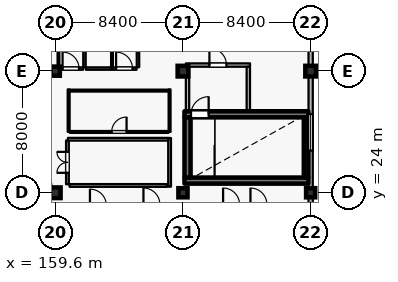
"""IFC4 building model, lengths in metres.
Left out: names, types, materials, properties, quantities, classifications, styles, units other than length and angle.
Written with IfcOpenShell. Run it as: python <this file> out.ifc"""

import sys

from ifc_helpers import new_model, si_unit, direction, frame, frame_2d, origin, origin_2d, place, context, subcontext, project, spatial, rectangle, extrude, element, fill, save


model = new_model("IFC4")
c1 = context("Model", 3, precision=1e-05, world=origin(), true_north=direction((0.0, 1.0)))
c2 = subcontext(c1, "Body", "Model", "MODEL_VIEW")
j1 = project(units=[si_unit("LENGTHUNIT", "METRE"), si_unit("PLANEANGLEUNIT", "RADIAN")], contexts=[c1])
p1 = place(None, origin())
s1 = spatial("IfcSite", under=j1, at=p1, CompositionType="ELEMENT")
p2 = place(p1, origin())
s2 = spatial("IfcBuilding", under=s1, at=p2, CompositionType="ELEMENT")
p3 = place(p2, frame((0.0, 0.0, 32.4)))
s3 = spatial("IfcBuildingStorey", under=s2, at=p3, CompositionType="ELEMENT", Elevation=32.4)
for number, where, z_axis, x_axis in (
    (1, (159.6, 24.0, 0.0), (0.0, 0.0, 1.0), (1.0, 0.0, 0.0)),
    (2, (168.0, 32.0, 0.0), (0.0, 0.0, 1.0), (1.0, 0.0, 0.0)),
    (3, (176.4, 32.0, 0.0), (0.0, 0.0, 1.0), (1.0, 0.0, 0.0)),
):
    element("IfcColumn", number, at=place(p3, frame(where, z_axis=z_axis, x_axis=x_axis)), inside=s3, PredefinedType="COLUMN", context=c2, shape_type="SweptSolid", body=[
        extrude(rectangle(XDim=0.7, YDim=0.7, at=origin_2d()), origin(), (0.0, 0.0, 1.0), 3.6),
    ])
for number, where, z_axis, x_axis in (
    (4, (159.6, 32.0, 0.0), (0.0, 0.0, 1.0), (1.0, 0.0, 0.0)),
    (5, (168.0, 24.0, 0.0), (0.0, 0.0, 1.0), (1.0, 0.0, 0.0)),
    (6, (176.4, 24.0, 0.0), (0.0, 0.0, 1.0), (1.0, 0.0, 0.0)),
):
    element("IfcColumn", number, at=place(p3, frame(where, z_axis=z_axis, x_axis=x_axis)), inside=s3, PredefinedType="COLUMN", context=c2, shape_type="SweptSolid", body=[
        extrude(rectangle(XDim=0.6, YDim=0.6, at=origin_2d()), origin(), (0.0, 0.0, 1.0), 3.6),
    ])
p4 = place(p3, frame((176.4, 39.7, 0.0), z_axis=(0.0, 0.0, 1.0), x_axis=(0.0, -1.0, 0.0)))
e7 = element("IfcWall", 7, at=p4, inside=s3, PredefinedType="SOLIDWALL", context=c2, shape_type="SweptSolid", body=[
    extrude(rectangle(XDim=7.35, YDim=0.28, at=frame_2d((3.675, 0.0))), origin(), (0.0, 0.0, 1.0), 2.7),
])
p5 = place(p4, frame((3.15, 0.0, 0.5)))
e8 = element("IfcOpeningElement", 8, at=p5, cuts=e7, PredefinedType="OPENING", context=c2, shape_type="SweptSolid", body=[
    extrude(rectangle(XDim=1.05, YDim=1.65, at=frame_2d((0.525, 0.825))), frame((0.0, 0.15, 0.0), z_axis=(0.0, -1.0, 0.0), x_axis=(1.0, 0.0, 0.0)), (0.0, 0.0, 1.0), 0.3),
])
p6 = place(p3, frame((176.4, 31.65, 0.0), z_axis=(0.0, 0.0, 1.0), x_axis=(0.0, -1.0, 0.0)))
e9 = element("IfcWall", 9, at=p6, inside=s3, PredefinedType="SOLIDWALL", context=c2, shape_type="SweptSolid", body=[
    extrude(rectangle(XDim=7.35, YDim=0.28, at=frame_2d((3.675, 0.0))), origin(), (0.0, 0.0, 1.0), 2.7),
])
p7 = place(p6, frame((2.475, 0.0, 0.5)))
e10 = element("IfcOpeningElement", 10, at=p7, cuts=e9, PredefinedType="OPENING", context=c2, shape_type="SweptSolid", body=[
    extrude(rectangle(XDim=2.4, YDim=1.65, at=frame_2d((1.2, 0.825))), frame((0.0, 0.15, 0.0), z_axis=(0.0, -1.0, 0.0), x_axis=(1.0, 0.0, 0.0)), (0.0, 0.0, 1.0), 0.3),
])
p8 = place(p3, frame((176.4, 23.7, 0.0), z_axis=(0.0, 0.0, 1.0), x_axis=(0.0, -1.0, 0.0)))
e11 = element("IfcWall", 11, at=p8, inside=s3, PredefinedType="SOLIDWALL", context=c2, shape_type="SweptSolid", body=[
    extrude(rectangle(XDim=7.35, YDim=0.28, at=frame_2d((3.675, 0.0))), origin(), (0.0, 0.0, 1.0), 2.7),
])
p9 = place(p8, frame((2.475, 0.0, 0.5)))
e12 = element("IfcOpeningElement", 12, at=p9, cuts=e11, PredefinedType="OPENING", context=c2, shape_type="SweptSolid", body=[
    extrude(rectangle(XDim=2.4, YDim=1.65, at=frame_2d((1.2, 0.825))), frame((0.0, 0.15, 0.0), z_axis=(0.0, -1.0, 0.0), x_axis=(1.0, 0.0, 0.0)), (0.0, 0.0, 1.0), 0.3),
])
p10 = place(p3, frame((168.1, 24.8, 0.0), z_axis=(0.0, 0.0, 1.0), x_axis=(1.0, 0.0, 0.0)))
e13 = element("IfcWall", 13, at=p10, inside=s3, PredefinedType="SHEAR", context=c2, shape_type="SweptSolid", body=[
    extrude(rectangle(XDim=8.15, YDim=0.4, at=frame_2d((4.075, 0.0))), origin(), (0.0, 0.0, 1.0), 3.335),
])
p11 = place(p3, frame((176.1, 25.005, 0.0), z_axis=(0.0, 0.0, 1.0), x_axis=(0.0, 1.0, 0.0)))
e14 = element("IfcWall", 14, at=p11, inside=s3, PredefinedType="SHEAR", context=c2, shape_type="SweptSolid", body=[
    extrude(rectangle(XDim=3.95, YDim=0.3, at=frame_2d((1.975, 0.0))), origin(), (0.0, 0.0, 1.0), 3.335),
])
p12 = place(p3, frame((168.1, 29.16, 0.0), z_axis=(0.0, 0.0, 1.0), x_axis=(1.0, 0.0, 0.0)))
e15 = element("IfcWall", 15, at=p12, inside=s3, PredefinedType="SHEAR", context=c2, shape_type="SweptSolid", body=[
    extrude(rectangle(XDim=8.15, YDim=0.4, at=frame_2d((4.075, 0.0))), origin(), (0.0, 0.0, 1.0), 3.335),
])
p13 = place(p12, frame((0.43, 0.0, 0.0)))
e16 = element("IfcOpeningElement", 16, at=p13, cuts=e15, PredefinedType="OPENING", context=c2, shape_type="SweptSolid", body=[
    extrude(rectangle(XDim=1.16, YDim=2.2, at=frame_2d((0.58, 1.1))), frame((0.0, 0.21, 0.0), z_axis=(0.0, -1.0, 0.0), x_axis=(1.0, 0.0, 0.0)), (0.0, 0.0, 1.0), 0.42),
])
p14 = place(p3, frame((168.3, 25.005, 0.0), z_axis=(0.0, 0.0, 1.0), x_axis=(0.0, 1.0, 0.0)))
e17 = element("IfcWall", 17, at=p14, inside=s3, PredefinedType="SHEAR", context=c2, shape_type="SweptSolid", body=[
    extrude(rectangle(XDim=3.95, YDim=0.4, at=frame_2d((1.975, 0.0))), origin(), (0.0, 0.0, 1.0), 3.335),
])
p15 = place(p3, frame((168.3, 29.365, 0.0), z_axis=(0.0, 0.0, 1.0), x_axis=(0.0, 1.0, 0.0)))
e18 = element("IfcWall", 18, at=p15, inside=s3, PredefinedType="PARTITIONING", context=c2, shape_type="SweptSolid", body=[
    extrude(rectangle(XDim=2.92, YDim=0.22, at=frame_2d((1.46, 0.0))), origin(), (0.0, 0.0, 1.0), 3.335),
])
p16 = place(p3, frame((168.19, 32.4, 0.0), z_axis=(0.0, 0.0, 1.0), x_axis=(1.0, 0.0, 0.0)))
e19 = element("IfcWall", 19, at=p16, inside=s3, PredefinedType="PARTITIONING", context=c2, shape_type="SweptSolid", body=[
    extrude(rectangle(XDim=4.22, YDim=0.22, at=frame_2d((2.11, 0.0))), origin(), (0.0, 0.0, 1.0), 3.335),
])
p17 = place(p16, frame((1.55, 0.0, 0.0)))
e20 = element("IfcOpeningElement", 20, at=p17, cuts=e19, PredefinedType="OPENING", context=c2, shape_type="SweptSolid", body=[
    extrude(rectangle(XDim=1.12, YDim=2.2, at=frame_2d((0.56, 1.1))), frame((0.0, 0.12, 0.0), z_axis=(0.0, -1.0, 0.0), x_axis=(1.0, 0.0, 0.0)), (0.0, 0.0, 1.0), 0.24),
])
p18 = place(p3, frame((172.3, 29.365, 0.0), z_axis=(0.0, 0.0, 1.0), x_axis=(0.0, 1.0, 0.0)))
e21 = element("IfcWall", 21, at=p18, inside=s3, PredefinedType="PARTITIONING", context=c2, shape_type="SweptSolid", body=[
    extrude(rectangle(XDim=2.92, YDim=0.22, at=frame_2d((1.46, 0.0))), origin(), (0.0, 0.0, 1.0), 3.335),
])
p19 = place(p3, frame((158.09, 32.17, 0.0), z_axis=(0.0, 0.0, 1.0), x_axis=(1.0, 0.0, 0.0)))
e22 = element("IfcWall", 22, at=p19, inside=s3, PredefinedType="PARTITIONING", context=c2, shape_type="SweptSolid", body=[
    extrude(rectangle(XDim=1.71, YDim=0.16, at=frame_2d((0.855, 0.0))), origin(), (0.0, 0.0, 1.0), 2.84),
])
p20 = place(p3, frame((159.81, 32.17, 0.0), z_axis=(0.0, 0.0, 1.0), x_axis=(1.0, 0.0, 0.0)))
e23 = element("IfcWall", 23, at=p20, inside=s3, PredefinedType="PARTITIONING", context=c2, shape_type="SweptSolid", body=[
    extrude(rectangle(XDim=1.62, YDim=0.16, at=frame_2d((0.81, 0.0))), origin(), (0.0, 0.0, 1.0), 3.335),
])
p21 = place(p20, frame((0.27, 0.0, 0.0)))
e24 = element("IfcOpeningElement", 24, at=p21, cuts=e23, PredefinedType="OPENING", context=c2, shape_type="SweptSolid", body=[
    extrude(rectangle(XDim=1.08, YDim=2.3, at=frame_2d((0.54, 1.15))), frame((0.0, 0.09, 0.0), z_axis=(0.0, -1.0, 0.0), x_axis=(1.0, 0.0, 0.0)), (0.0, 0.0, 1.0), 0.18),
])
p22 = place(p3, frame((159.81, 32.26, 0.0), z_axis=(0.0, 0.0, 1.0), x_axis=(0.0, 1.0, 0.0)))
e25 = element("IfcWall", 25, at=p22, inside=s3, PredefinedType="PARTITIONING", context=c2, shape_type="SweptSolid", body=[
    extrude(rectangle(XDim=2.45, YDim=0.115, at=frame_2d((1.225, 0.0))), origin(), (0.0, 0.0, 1.0), 2.74),
])
p23 = place(p3, frame((161.61, 32.17, 0.0), z_axis=(0.0, 0.0, 1.0), x_axis=(1.0, 0.0, 0.0)))
e26 = element("IfcWall", 26, at=p23, inside=s3, PredefinedType="PARTITIONING", context=c2, shape_type="SweptSolid", body=[
    extrude(rectangle(XDim=1.71, YDim=0.16, at=frame_2d((0.855, 0.0))), origin(), (0.0, 0.0, 1.0), 3.335),
])
p24 = place(p3, frame((163.33, 32.17, 0.0), z_axis=(0.0, 0.0, 1.0), x_axis=(1.0, 0.0, 0.0)))
e27 = element("IfcWall", 27, at=p24, inside=s3, PredefinedType="PARTITIONING", context=c2, shape_type="SweptSolid", body=[
    extrude(rectangle(XDim=1.62, YDim=0.16, at=frame_2d((0.81, 0.0))), origin(), (0.0, 0.0, 1.0), 3.335),
])
p25 = place(p24, frame((0.27, 0.0, 0.0)))
e28 = element("IfcOpeningElement", 28, at=p25, cuts=e27, PredefinedType="OPENING", context=c2, shape_type="SweptSolid", body=[
    extrude(rectangle(XDim=1.08, YDim=2.3, at=frame_2d((0.54, 1.15))), frame((0.0, 0.09, 0.0), z_axis=(0.0, -1.0, 0.0), x_axis=(1.0, 0.0, 0.0)), (0.0, 0.0, 1.0), 0.18),
])
p26 = place(p3, frame((163.33, 32.26, 0.0), z_axis=(0.0, 0.0, 1.0), x_axis=(0.0, 1.0, 0.0)))
e29 = element("IfcWall", 29, at=p26, inside=s3, PredefinedType="PARTITIONING", context=c2, shape_type="SweptSolid", body=[
    extrude(rectangle(XDim=2.45, YDim=0.115, at=frame_2d((1.225, 0.0))), origin(), (0.0, 0.0, 1.0), 3.335),
])
p27 = place(p3, frame((161.52, 32.26, 0.0), z_axis=(0.0, 0.0, 1.0), x_axis=(0.0, 1.0, 0.0)))
e30 = element("IfcWall", 30, at=p27, inside=s3, PredefinedType="PARTITIONING", context=c2, shape_type="SweptSolid", body=[
    extrude(rectangle(XDim=9.23, YDim=0.16, at=frame_2d((4.615, 0.0))), origin(), (0.0, 0.0, 1.0), 3.335),
])
p28 = place(p3, frame((165.04, 32.26, 0.0), z_axis=(0.0, 0.0, 1.0), x_axis=(0.0, 1.0, 0.0)))
e31 = element("IfcWall", 31, at=p28, inside=s3, PredefinedType="PARTITIONING", context=c2, shape_type="SweptSolid", body=[
    extrude(rectangle(XDim=8.64, YDim=0.16, at=frame_2d((4.32, 0.0))), origin(), (0.0, 0.0, 1.0), 3.335),
])
p29 = place(p3, frame((160.4, 24.56, 0.0), z_axis=(0.0, 0.0, 1.0), x_axis=(0.0, 1.0, 0.0)))
e32 = element("IfcWall", 32, at=p29, inside=s3, PredefinedType="PARTITIONING", context=c2, shape_type="SweptSolid", body=[
    extrude(rectangle(XDim=2.88, YDim=0.18, at=frame_2d((1.44, 0.0))), origin(), (0.0, 0.0, 1.0), 3.335),
])
p30 = place(p29, frame((0.75, 0.0, 0.0)))
e33 = element("IfcOpeningElement", 33, at=p30, cuts=e32, PredefinedType="OPENING", context=c2, shape_type="SweptSolid", body=[
    extrude(rectangle(XDim=1.38, YDim=2.3, at=frame_2d((0.69, 1.15))), frame((0.0, 0.1, 0.0), z_axis=(0.0, -1.0, 0.0), x_axis=(1.0, 0.0, 0.0)), (0.0, 0.0, 1.0), 0.2),
])
p31 = place(p3, frame((160.54, 24.48, 0.0), z_axis=(0.0, 0.0, 1.0), x_axis=(1.0, 0.0, 0.0)))
e34 = element("IfcWall", 34, at=p31, inside=s3, PredefinedType="PARTITIONING", context=c2, shape_type="SweptSolid", body=[
    extrude(rectangle(XDim=6.41, YDim=0.18, at=frame_2d((3.205, 0.0))), origin(), (0.0, 0.0, 1.0), 3.335),
])
p32 = place(p3, frame((160.56, 28.0, 0.0), z_axis=(0.0, 0.0, 1.0), x_axis=(1.0, 0.0, 0.0)))
e35 = element("IfcWall", 35, at=p32, inside=s3, PredefinedType="PARTITIONING", context=c2, shape_type="SweptSolid", body=[
    extrude(rectangle(XDim=6.48, YDim=0.125, at=frame_2d((3.24, 0.0))), origin(), (0.0, 0.0, 1.0), 3.335),
])
p33 = place(p32, frame((2.75, 0.0, 0.0)))
e36 = element("IfcOpeningElement", 36, at=p33, cuts=e35, PredefinedType="OPENING", context=c2, shape_type="SweptSolid", body=[
    extrude(rectangle(XDim=0.98, YDim=2.15, at=frame_2d((0.49, 1.075))), frame((0.0, 0.073, 0.0), z_axis=(0.0, -1.0, 0.0), x_axis=(1.0, 0.0, 0.0)), (0.0, 0.0, 1.0), 0.145),
])
p34 = place(p3, frame((167.12, 24.4, 0.0), z_axis=(0.0, 0.0, 1.0), x_axis=(0.0, 1.0, 0.0)))
e37 = element("IfcWall", 37, at=p34, inside=s3, PredefinedType="PARTITIONING", context=c2, shape_type="SweptSolid", body=[
    extrude(rectangle(XDim=3.2, YDim=0.18, at=frame_2d((1.6, 0.0))), origin(), (0.0, 0.0, 1.0), 3.335),
])
p35 = place(p3, frame((160.432, 27.52, 0.0), z_axis=(0.0, 0.0, 1.0), x_axis=(1.0, 0.0, 0.0)))
e38 = element("IfcWall", 38, at=p35, inside=s3, PredefinedType="PARTITIONING", context=c2, shape_type="SweptSolid", body=[
    extrude(rectangle(XDim=6.598, YDim=0.18, at=frame_2d((3.299, 0.0))), origin(), (0.0, 0.0, 1.0), 3.335),
])
for number, where, z_axis, x_axis in (
    (39, (160.48, 28.004, 0.0), (0.0, 0.0, 1.0), (0.0, 1.0, 0.0)),
    (40, (167.12, 28.004, 0.0), (0.0, 0.0, 1.0), (0.0, 1.0, 0.0)),
):
    element("IfcWall", number, at=place(p3, frame(where, z_axis=z_axis, x_axis=x_axis)), inside=s3, PredefinedType="PARTITIONING", context=c2, shape_type="SweptSolid", body=[
        extrude(rectangle(XDim=2.796, YDim=0.125, at=frame_2d((1.398, 0.0))), origin(), (0.0, 0.0, 1.0), 3.335),
    ])
p36 = place(p3, frame((160.543, 30.72, 0.0), z_axis=(0.0, 0.0, 1.0), x_axis=(1.0, 0.0, 0.0)))
e41 = element("IfcWall", 41, at=p36, inside=s3, PredefinedType="PARTITIONING", context=c2, shape_type="SweptSolid", body=[
    extrude(rectangle(XDim=6.514, YDim=0.125, at=frame_2d((3.257, 0.0))), origin(), (0.0, 0.0, 1.0), 3.335),
])
p37 = place(p7, origin())
e42 = element("IfcWindow", 42, at=p37, inside=s3, PartitioningType="DOUBLE_PANEL_VERTICAL", PredefinedType="WINDOW", context=c2, shape_type="SweptSolid", body=[
    extrude(rectangle(XDim=2.4, YDim=1.65, at=frame_2d((1.2, 0.825))), frame((0.0, 0.03, 0.0), z_axis=(0.0, -1.0, 0.0), x_axis=(1.0, 0.0, 0.0)), (0.0, 0.0, 1.0), 0.06),
])
fill(e10, e42)
p38 = place(p13, origin())
e43 = element("IfcDoor", 43, at=p38, inside=s3, OperationType="SINGLE_SWING_RIGHT", PredefinedType="DOOR", context=c2, shape_type="SweptSolid", body=[
    extrude(rectangle(XDim=1.16, YDim=2.2, at=frame_2d((0.58, 1.1))), frame((0.0, 0.025, 0.0), z_axis=(0.0, -1.0, 0.0), x_axis=(1.0, 0.0, 0.0)), (0.0, 0.0, 1.0), 0.05),
])
fill(e16, e43)
p39 = place(p17, origin())
e44 = element("IfcDoor", 44, at=p39, inside=s3, OperationType="SINGLE_SWING_LEFT", PredefinedType="DOOR", context=c2, shape_type="SweptSolid", body=[
    extrude(rectangle(XDim=1.12, YDim=2.2, at=frame_2d((0.56, 1.1))), frame((0.0, 0.025, 0.0), z_axis=(0.0, -1.0, 0.0), x_axis=(1.0, 0.0, 0.0)), (0.0, 0.0, 1.0), 0.05),
])
fill(e20, e44)
p40 = place(p21, origin())
e45 = element("IfcDoor", 45, at=p40, inside=s3, OperationType="SINGLE_SWING_LEFT", PredefinedType="DOOR", context=c2, shape_type="SweptSolid", body=[
    extrude(rectangle(XDim=1.08, YDim=2.3, at=frame_2d((0.54, 1.15))), frame((0.0, 0.025, 0.0), z_axis=(0.0, -1.0, 0.0), x_axis=(1.0, 0.0, 0.0)), (0.0, 0.0, 1.0), 0.05),
])
fill(e24, e45)
p41 = place(p25, origin())
e46 = element("IfcDoor", 46, at=p41, inside=s3, OperationType="SINGLE_SWING_LEFT", PredefinedType="DOOR", context=c2, shape_type="SweptSolid", body=[
    extrude(rectangle(XDim=1.08, YDim=2.3, at=frame_2d((0.54, 1.15))), frame((0.0, 0.025, 0.0), z_axis=(0.0, -1.0, 0.0), x_axis=(1.0, 0.0, 0.0)), (0.0, 0.0, 1.0), 0.05),
])
fill(e28, e46)
p42 = place(p30, origin())
e47 = element("IfcDoor", 47, at=p42, inside=s3, OperationType="DOUBLE_DOOR_SINGLE_SWING", PredefinedType="DOOR", context=c2, shape_type="SweptSolid", body=[
    extrude(rectangle(XDim=1.38, YDim=2.3, at=frame_2d((0.69, 1.15))), frame((0.0, 0.025, 0.0), z_axis=(0.0, -1.0, 0.0), x_axis=(1.0, 0.0, 0.0)), (0.0, 0.0, 1.0), 0.05),
])
fill(e33, e47)
p43 = place(p33, origin())
e48 = element("IfcDoor", 48, at=p43, inside=s3, OperationType="SINGLE_SWING_RIGHT", PredefinedType="DOOR", context=c2, shape_type="SweptSolid", body=[
    extrude(rectangle(XDim=0.98, YDim=2.15, at=frame_2d((0.49, 1.075))), frame((0.0, 0.025, 0.0), z_axis=(0.0, -1.0, 0.0), x_axis=(1.0, 0.0, 0.0)), (0.0, 0.0, 1.0), 0.05),
])
fill(e36, e48)
save(model, sys.argv[1])
